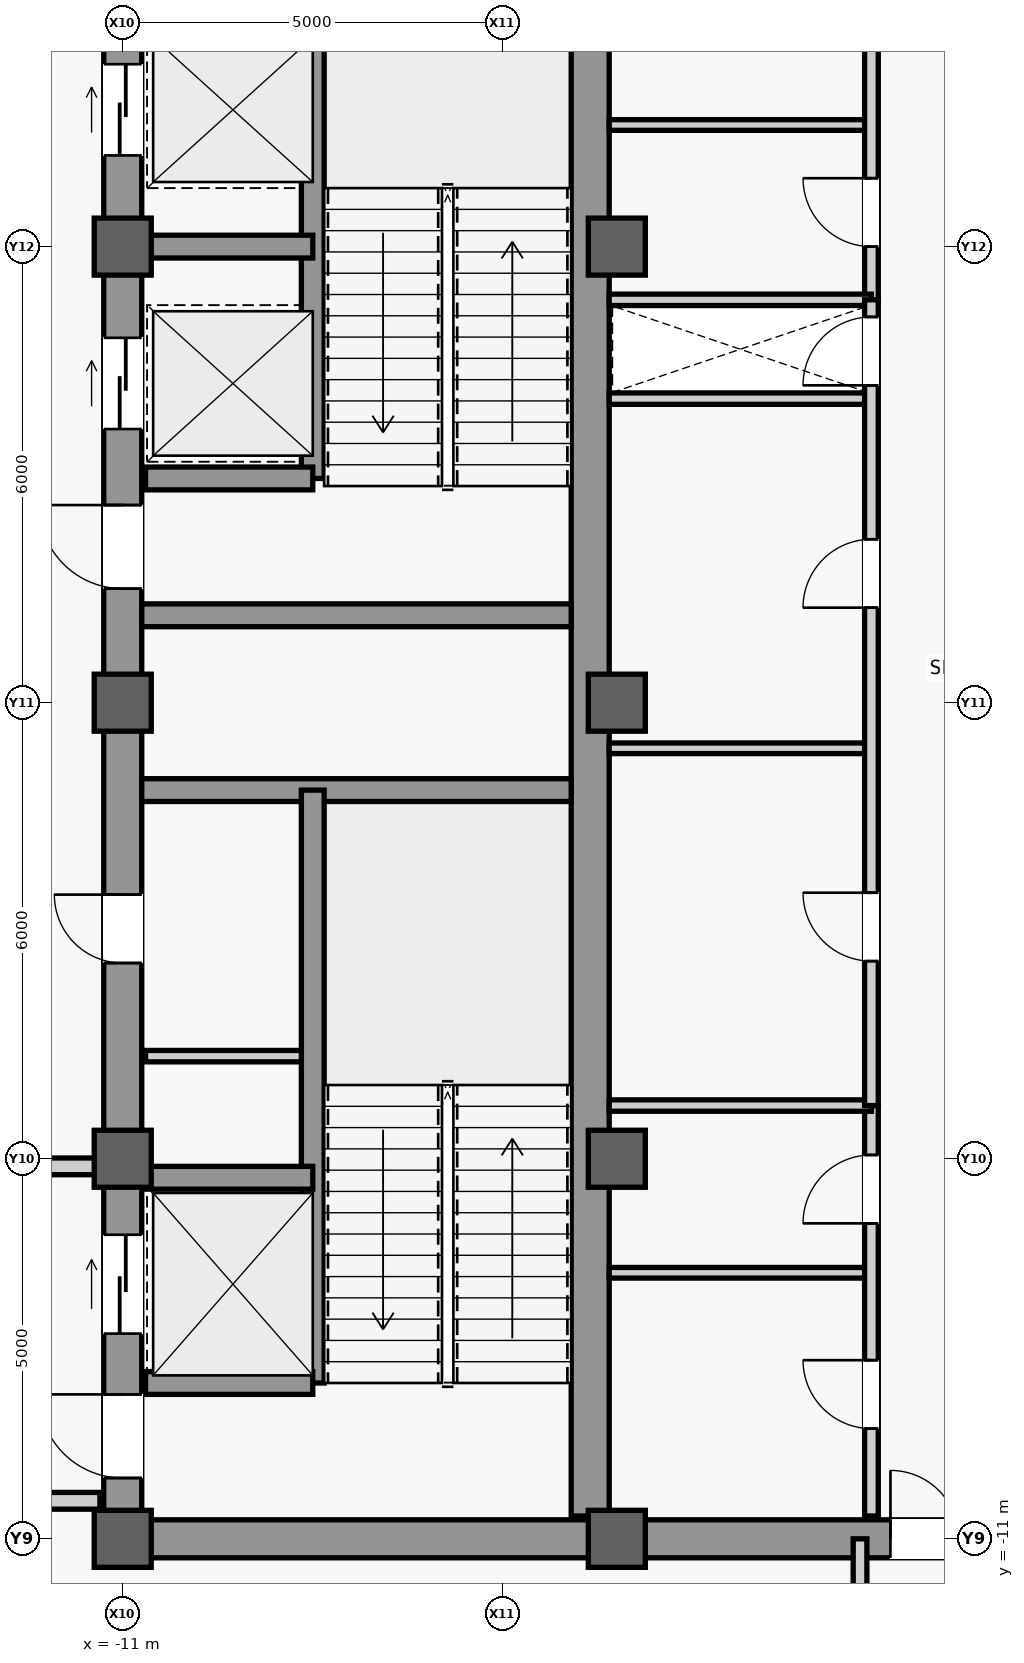
"""IFC4 building model, lengths in metres.
Left out: names, types, materials, properties, quantities, classifications, styles, units other than length and angle.
Written with IfcOpenShell. Run it as: python <this file> out.ifc"""

import sys

from ifc_helpers import new_model, si_unit, direction, frame, frame_2d, origin, origin_2d, place, context, subcontext, project, spatial, rectangle, extrude, source, transform, mapped, element, fill, save


model = new_model("IFC4")
c1 = context("Model", 3, precision=1e-05, world=origin(), true_north=direction((0.0, 1.0)))
c2 = subcontext(c1, "Body", "Model", "MODEL_VIEW")
j1 = project(units=[si_unit("LENGTHUNIT", "METRE"), si_unit("PLANEANGLEUNIT", "RADIAN")], contexts=[c1])
p1 = place(None, origin())
s1 = spatial("IfcSite", under=j1, at=p1, CompositionType="ELEMENT")
p2 = place(p1, origin())
s2 = spatial("IfcBuilding", under=s1, at=p2, CompositionType="ELEMENT")
p3 = place(p2, frame((0.0, 0.0, 370.3)))
s3 = spatial("IfcBuildingStorey", under=s2, at=p3, CompositionType="ELEMENT", Elevation=370.3)
m1 = source(origin(), c2, "Body", "SweptSolid", [
    extrude(rectangle(XDim=22.0, YDim=0.5, at=frame_2d((11.0, 0.0))), origin(), (0.0, 0.0, 1.0), 4.6),
])
p4 = place(p3, frame((-11.0, -11.0, 0.0), z_axis=(0.0, 0.0, 1.0), x_axis=(0.0, 1.0, 0.0)))
e1 = element("IfcWall", 1, at=p4, inside=s3, PredefinedType="SHEAR", context=c2, shape_type="MappedRepresentation", body=[
    mapped(m1, transform((0.0, 0.0, 0.0), scale=1.0)),
])
m2 = source(origin(), c2, "Body", "SweptSolid", [
    extrude(rectangle(XDim=1.1, YDim=2.2, at=frame_2d((0.55, 1.1))), frame((0.0, 0.26, 0.0), z_axis=(0.0, -1.0, 0.0), x_axis=(1.0, 0.0, 0.0)), (0.0, 0.0, 1.0), 0.52),
])
p5 = place(p4, frame((0.8, 0.0, 0.0)))
e2 = element("IfcOpeningElement", 2, at=p5, cuts=e1, PredefinedType="OPENING", context=c2, shape_type="MappedRepresentation", body=[
    mapped(m2, transform((0.0, 0.0, 0.0), scale=1.0)),
])
p6 = place(p4, frame((12.5, 0.0, 0.0)))
e3 = element("IfcOpeningElement", 3, at=p6, cuts=e1, PredefinedType="OPENING", context=c2, shape_type="MappedRepresentation", body=[
    mapped(m2, transform((0.0, 0.0, 0.0), scale=1.0)),
])
m3 = source(origin(), c2, "Body", "SweptSolid", [
    extrude(rectangle(XDim=0.9, YDim=2.15, at=frame_2d((0.45, 1.075))), frame((0.0, 0.26, 0.0), z_axis=(0.0, -1.0, 0.0), x_axis=(1.0, 0.0, 0.0)), (0.0, 0.0, 1.0), 0.52),
])
p7 = place(p4, frame((7.575, 0.0, 0.0)))
e4 = element("IfcOpeningElement", 4, at=p7, cuts=e1, PredefinedType="OPENING", context=c2, shape_type="MappedRepresentation", body=[
    mapped(m3, transform((0.0, 0.0, 0.0), scale=1.0)),
])
m4 = source(origin(), c2, "Body", "SweptSolid", [
    extrude(rectangle(XDim=1.2, YDim=2.3, at=frame_2d((0.6, 1.15))), frame((0.0, 0.26, 0.0), z_axis=(0.0, -1.0, 0.0), x_axis=(1.0, 0.0, 0.0)), (0.0, 0.0, 1.0), 0.52),
])
p8 = place(p4, frame((14.6, 0.0, 0.0)))
e5 = element("IfcOpeningElement", 5, at=p8, cuts=e1, PredefinedType="OPENING", context=c2, shape_type="MappedRepresentation", body=[
    mapped(m4, transform((0.0, 0.0, 0.0), scale=1.0)),
])
p9 = place(p4, frame((18.2, 0.0, 0.0)))
e6 = element("IfcOpeningElement", 6, at=p9, cuts=e1, PredefinedType="OPENING", context=c2, shape_type="MappedRepresentation", body=[
    mapped(m4, transform((0.0, 0.0, 0.0), scale=1.0)),
])
m5 = source(origin(), c2, "Body", "SweptSolid", [
    extrude(rectangle(XDim=1.3, YDim=2.3, at=frame_2d((0.65, 1.15))), frame((0.0, 0.26, 0.0), z_axis=(0.0, -1.0, 0.0), x_axis=(1.0, 0.0, 0.0)), (0.0, 0.0, 1.0), 0.52),
])
p10 = place(p4, frame((2.7, 0.0, 0.0)))
e7 = element("IfcOpeningElement", 7, at=p10, cuts=e1, PredefinedType="OPENING", context=c2, shape_type="MappedRepresentation", body=[
    mapped(m5, transform((0.0, 0.0, 0.0), scale=1.0)),
])
m6 = source(origin(), c2, "Body", "SweptSolid", [
    extrude(rectangle(XDim=21.4, YDim=0.5, at=frame_2d((10.7, 0.0))), origin(), (0.0, 0.0, 1.0), 4.6),
])
p11 = place(p3, frame((-4.85, -10.7, 0.0), z_axis=(0.0, 0.0, 1.0), x_axis=(0.0, 1.0, 0.0)))
e8 = element("IfcWall", 8, at=p11, inside=s3, PredefinedType="SHEAR", context=c2, shape_type="MappedRepresentation", body=[
    mapped(m6, transform((0.0, 0.0, 0.0), scale=1.0)),
])
m7 = source(origin(), c2, "Body", "SweptSolid", [
    extrude(rectangle(XDim=5.9, YDim=0.5, at=frame_2d((2.95, 0.0))), origin(), (0.0, 0.0, 1.0), 4.6),
])
p12 = place(p3, frame((-10.75, -11.0, 0.0), z_axis=(0.0, 0.0, 1.0), x_axis=(1.0, 0.0, 0.0)))
e9 = element("IfcWall", 9, at=p12, inside=s3, PredefinedType="SHEAR", context=c2, shape_type="MappedRepresentation", body=[
    mapped(m7, transform((0.0, 0.0, 0.0), scale=1.0)),
])
m8 = source(origin(), c2, "Body", "SweptSolid", [
    extrude(rectangle(XDim=5.65, YDim=0.3, at=frame_2d((2.825, 0.0))), origin(), (0.0, 0.0, 1.0), 4.6),
])
for number, where, z_axis, x_axis in (
    (10, (-10.75, -1.15, 0.0), (0.0, 0.0, 1.0), (1.0, 0.0, 0.0)),
    (11, (-10.75, 1.15, 0.0), (0.0, 0.0, 1.0), (1.0, 0.0, 0.0)),
):
    element("IfcWall", number, at=place(p3, frame(where, z_axis=z_axis, x_axis=x_axis)), inside=s3, PredefinedType="SHEAR", context=c2, shape_type="MappedRepresentation", body=[
        mapped(m8, transform((0.0, 0.0, 0.0), scale=1.0)),
    ])
m9 = source(origin(), c2, "Body", "SweptSolid", [
    extrude(rectangle(XDim=9.2, YDim=0.5, at=frame_2d((4.6, 0.0))), origin(), (0.0, 0.0, 1.0), 4.6),
])
p13 = place(p3, frame((-4.6, -11.0, 0.0), z_axis=(0.0, 0.0, 1.0), x_axis=(1.0, 0.0, 0.0)))
e12 = element("IfcWall", 12, at=p13, inside=s3, PredefinedType="SHEAR", context=c2, shape_type="MappedRepresentation", body=[
    mapped(m9, transform((0.0, 0.0, 0.0), scale=1.0)),
])
m10 = source(origin(), c2, "Body", "SweptSolid", [
    extrude(rectangle(XDim=1.8, YDim=2.25, at=frame_2d((0.9, 1.125))), frame((0.0, 0.26, 0.0), z_axis=(0.0, -1.0, 0.0), x_axis=(1.0, 0.0, 0.0)), (0.0, 0.0, 1.0), 0.52),
])
p14 = place(p13, frame((3.7, 0.0, 0.0)))
e13 = element("IfcOpeningElement", 13, at=p14, cuts=e12, PredefinedType="OPENING", context=c2, shape_type="MappedRepresentation", body=[
    mapped(m10, transform((0.0, 0.0, 0.0), scale=1.0)),
])
m11 = source(origin(), c2, "Body", "SweptSolid", [
    extrude(rectangle(XDim=0.75, YDim=0.75, at=origin_2d()), origin(), (0.0, 0.0, 1.0), 5.2),
])
for number, where, z_axis, x_axis in (
    (14, (-11.0, -11.0, 0.0), (0.0, 0.0, 1.0), (1.0, 0.0, 0.0)),
    (15, (-11.0, -6.0, 0.0), (0.0, 0.0, 1.0), (1.0, 0.0, 0.0)),
    (16, (-11.0, 0.0, 0.0), (0.0, 0.0, 1.0), (1.0, 0.0, 0.0)),
    (17, (-11.0, 6.0, 0.0), (0.0, 0.0, 1.0), (1.0, 0.0, 0.0)),
    (18, (-4.5, -11.0, 0.0), (0.0, 0.0, 1.0), (1.0, 0.0, 0.0)),
    (19, (-4.5, -6.0, 0.0), (0.0, 0.0, 1.0), (1.0, 0.0, 0.0)),
    (20, (-4.5, 0.0, 0.0), (0.0, 0.0, 1.0), (1.0, 0.0, 0.0)),
    (21, (-4.5, 6.0, 0.0), (0.0, 0.0, 1.0), (1.0, 0.0, 0.0)),
):
    element("IfcColumn", number, at=place(p3, frame(where, z_axis=z_axis, x_axis=x_axis)), inside=s3, PredefinedType="COLUMN", context=c2, shape_type="MappedRepresentation", body=[
        mapped(m11, transform((0.0, 0.0, 0.0), scale=1.0)),
    ])
m12 = source(origin(), c2, "Body", "SweptSolid", [
    extrude(rectangle(XDim=7.8, YDim=0.3, at=frame_2d((3.9, 0.0))), origin(), (0.0, 0.0, 1.0), 4.6),
])
p15 = place(p3, frame((-8.5, -8.95, 0.0), z_axis=(0.0, 0.0, 1.0), x_axis=(0.0, 1.0, 0.0)))
e22 = element("IfcWall", 22, at=p15, inside=s3, PredefinedType="SHEAR", context=c2, shape_type="MappedRepresentation", body=[
    mapped(m12, transform((0.0, 0.0, 0.0), scale=1.0)),
])
m13 = source(origin(), c2, "Body", "SweptSolid", [
    extrude(rectangle(XDim=2.2, YDim=0.3, at=frame_2d((1.1, 0.0))), origin(), (0.0, 0.0, 1.0), 4.6),
])
for number, where, z_axis, x_axis in (
    (23, (-10.7, -8.95, 0.0), (0.0, 0.0, 1.0), (1.0, 0.0, 0.0)),
    (24, (-10.7, -6.25, 0.0), (0.0, 0.0, 1.0), (1.0, 0.0, 0.0)),
):
    element("IfcWall", number, at=place(p3, frame(where, z_axis=z_axis, x_axis=x_axis)), inside=s3, PredefinedType="SHEAR", context=c2, shape_type="MappedRepresentation", body=[
        mapped(m13, transform((0.0, 0.0, 0.0), scale=1.0)),
    ])
m14 = source(origin(), c2, "Body", "SweptSolid", [
    extrude(rectangle(XDim=7.75, YDim=0.3, at=frame_2d((3.875, 0.0))), origin(), (0.0, 0.0, 1.0), 4.6),
])
p16 = place(p3, frame((-8.5, 2.95, 0.0), z_axis=(0.0, 0.0, 1.0), x_axis=(0.0, 1.0, 0.0)))
e25 = element("IfcWall", 25, at=p16, inside=s3, PredefinedType="SHEAR", context=c2, shape_type="MappedRepresentation", body=[
    mapped(m14, transform((0.0, 0.0, 0.0), scale=1.0)),
])
for number, where, z_axis, x_axis in (
    (26, (-10.7, 2.95, 0.0), (0.0, 0.0, 1.0), (1.0, 0.0, 0.0)),
    (27, (-10.7, 6.0, 0.0), (0.0, 0.0, 1.0), (1.0, 0.0, 0.0)),
):
    element("IfcWall", number, at=place(p3, frame(where, z_axis=z_axis, x_axis=x_axis)), inside=s3, PredefinedType="SHEAR", context=c2, shape_type="MappedRepresentation", body=[
        mapped(m13, transform((0.0, 0.0, 0.0), scale=1.0)),
    ])
m15 = source(origin(), c2, "Body", "SweptSolid", [
    extrude(rectangle(XDim=2.05, YDim=0.15, at=frame_2d((1.025, 0.0))), origin(), (0.0, 0.0, 1.0), 4.6),
])
p17 = place(p3, frame((-10.7, -4.65, 0.0), z_axis=(0.0, 0.0, 1.0), x_axis=(1.0, 0.0, 0.0)))
e28 = element("IfcWall", 28, at=p17, inside=s3, PredefinedType="PARTITIONING", context=c2, shape_type="MappedRepresentation", body=[
    mapped(m15, transform((0.0, 0.0, 0.0), scale=1.0)),
])
m16 = source(origin(), c2, "Body", "SweptSolid", [
    extrude(rectangle(XDim=4.05, YDim=0.22, at=frame_2d((2.025, 0.0))), origin(), (0.0, 0.0, 1.0), 4.6),
])
p18 = place(p3, frame((-15.35, -10.5, 0.0), z_axis=(0.0, 0.0, 1.0), x_axis=(1.0, 0.0, 0.0)))
e29 = element("IfcWall", 29, at=p18, inside=s3, PredefinedType="PARTITIONING", context=c2, shape_type="MappedRepresentation", body=[
    mapped(m16, transform((0.0, 0.0, 0.0), scale=1.0)),
])
m17 = source(origin(), c2, "Body", "SweptSolid", [
    extrude(rectangle(XDim=4.05, YDim=0.22, at=frame_2d((2.025, 0.0))), origin(), (0.0, 0.0, 1.0), 2.8),
])
p19 = place(p3, frame((-15.35, -6.1, 0.0), z_axis=(0.0, 0.0, 1.0), x_axis=(1.0, 0.0, 0.0)))
e30 = element("IfcWall", 30, at=p19, inside=s3, PredefinedType="PARTITIONING", context=c2, shape_type="MappedRepresentation", body=[
    mapped(m17, transform((0.0, 0.0, 0.0), scale=1.0)),
])
m18 = source(origin(), c2, "Body", "SweptSolid", [
    extrude(rectangle(XDim=3.45, YDim=0.15, at=frame_2d((1.725, 0.0))), origin(), (0.0, 0.0, 1.0), 4.6),
])
p20 = place(p3, frame((-4.6, 4.0, 0.0), z_axis=(0.0, 0.0, 1.0), x_axis=(1.0, 0.0, 0.0)))
e31 = element("IfcWall", 31, at=p20, inside=s3, PredefinedType="PARTITIONING", context=c2, shape_type="MappedRepresentation", body=[
    mapped(m18, transform((0.0, 0.0, 0.0), scale=1.0)),
])
m19 = source(origin(), c2, "Body", "SweptSolid", [
    extrude(rectangle(XDim=3.45, YDim=0.14, at=frame_2d((1.725, 0.0))), origin(), (0.0, 0.0, 1.0), 4.6),
])
p21 = place(p3, frame((-4.6, -7.5, 0.0), z_axis=(0.0, 0.0, 1.0), x_axis=(1.0, 0.0, 0.0)))
e32 = element("IfcWall", 32, at=p21, inside=s3, PredefinedType="PARTITIONING", context=c2, shape_type="MappedRepresentation", body=[
    mapped(m19, transform((0.0, 0.0, 0.0), scale=1.0)),
])
m20 = source(origin(), c2, "Body", "SweptSolid", [
    extrude(rectangle(XDim=5.4, YDim=0.18, at=frame_2d((2.7, 0.0))), origin(), (0.0, 0.0, 1.0), 4.6),
])
p22 = place(p3, frame((-1.15, -10.7, 0.0), z_axis=(0.0, 0.0, 1.0), x_axis=(0.0, 1.0, 0.0)))
e33 = element("IfcWall", 33, at=p22, inside=s3, PredefinedType="PARTITIONING", context=c2, shape_type="MappedRepresentation", body=[
    mapped(m20, transform((0.0, 0.0, 0.0), scale=1.0)),
])
m21 = source(origin(), c2, "Body", "SweptSolid", [
    extrude(rectangle(XDim=0.9, YDim=2.15, at=frame_2d((0.45, 1.075))), frame((0.0, 0.1, 0.0), z_axis=(0.0, -1.0, 0.0), x_axis=(1.0, 0.0, 0.0)), (0.0, 0.0, 1.0), 0.2),
])
p23 = place(p22, frame((1.15, 0.0, 0.0)))
e34 = element("IfcOpeningElement", 34, at=p23, cuts=e33, PredefinedType="OPENING", context=c2, shape_type="MappedRepresentation", body=[
    mapped(m21, transform((0.0, 0.0, 0.0), scale=1.0)),
])
p24 = place(p22, frame((3.85, 0.0, 0.0)))
e35 = element("IfcOpeningElement", 35, at=p24, cuts=e33, PredefinedType="OPENING", context=c2, shape_type="MappedRepresentation", body=[
    mapped(m21, transform((0.0, 0.0, 0.0), scale=1.0)),
])
p25 = place(p3, frame((-4.6, -5.3, 0.0), z_axis=(0.0, 0.0, 1.0), x_axis=(1.0, 0.0, 0.0)))
e36 = element("IfcWall", 36, at=p25, inside=s3, PredefinedType="PARTITIONING", context=c2, shape_type="MappedRepresentation", body=[
    mapped(m18, transform((0.0, 0.0, 0.0), scale=1.0)),
])
p26 = place(p3, frame((-4.6, 7.6, 0.0), z_axis=(0.0, 0.0, 1.0), x_axis=(1.0, 0.0, 0.0)))
e37 = element("IfcWall", 37, at=p26, inside=s3, PredefinedType="PARTITIONING", context=c2, shape_type="MappedRepresentation", body=[
    mapped(m19, transform((0.0, 0.0, 0.0), scale=1.0)),
])
p27 = place(p3, frame((-1.15, 5.3, 0.0), z_axis=(0.0, 0.0, 1.0), x_axis=(0.0, 1.0, 0.0)))
e38 = element("IfcWall", 38, at=p27, inside=s3, PredefinedType="PARTITIONING", context=c2, shape_type="MappedRepresentation", body=[
    mapped(m20, transform((0.0, 0.0, 0.0), scale=1.0)),
])
p28 = place(p27, frame((0.7, 0.0, 0.0)))
e39 = element("IfcOpeningElement", 39, at=p28, cuts=e38, PredefinedType="OPENING", context=c2, shape_type="MappedRepresentation", body=[
    mapped(m21, transform((0.0, 0.0, 0.0), scale=1.0)),
])
p29 = place(p27, frame((3.4, 0.0, 0.0)))
e40 = element("IfcOpeningElement", 40, at=p29, cuts=e38, PredefinedType="OPENING", context=c2, shape_type="MappedRepresentation", body=[
    mapped(m21, transform((0.0, 0.0, 0.0), scale=1.0)),
])
p30 = place(p3, frame((-4.6, 5.3, 0.0), z_axis=(0.0, 0.0, 1.0), x_axis=(1.0, 0.0, 0.0)))
e41 = element("IfcWall", 41, at=p30, inside=s3, PredefinedType="PARTITIONING", context=c2, shape_type="MappedRepresentation", body=[
    mapped(m18, transform((0.0, 0.0, 0.0), scale=1.0)),
])
p31 = place(p3, frame((-4.6, -0.6, 0.0), z_axis=(0.0, 0.0, 1.0), x_axis=(1.0, 0.0, 0.0)))
e42 = element("IfcWall", 42, at=p31, inside=s3, PredefinedType="PARTITIONING", context=c2, shape_type="MappedRepresentation", body=[
    mapped(m19, transform((0.0, 0.0, 0.0), scale=1.0)),
])
m22 = source(origin(), c2, "Body", "SweptSolid", [
    extrude(rectangle(XDim=10.6, YDim=0.18, at=frame_2d((5.3, 0.0))), origin(), (0.0, 0.0, 1.0), 4.6),
])
p32 = place(p3, frame((-1.15, -5.3, 0.0), z_axis=(0.0, 0.0, 1.0), x_axis=(0.0, 1.0, 0.0)))
e43 = element("IfcWall", 43, at=p32, inside=s3, PredefinedType="PARTITIONING", context=c2, shape_type="MappedRepresentation", body=[
    mapped(m22, transform((0.0, 0.0, 0.0), scale=1.0)),
])
p33 = place(p32, frame((1.9, 0.0, 0.0)))
e44 = element("IfcOpeningElement", 44, at=p33, cuts=e43, PredefinedType="OPENING", context=c2, shape_type="MappedRepresentation", body=[
    mapped(m21, transform((0.0, 0.0, 0.0), scale=1.0)),
])
p34 = place(p32, frame((6.55, 0.0, 0.0)))
e45 = element("IfcOpeningElement", 45, at=p34, cuts=e43, PredefinedType="OPENING", context=c2, shape_type="MappedRepresentation", body=[
    mapped(m21, transform((0.0, 0.0, 0.0), scale=1.0)),
])
p35 = place(p32, frame((9.475, 0.0, 0.0)))
e46 = element("IfcOpeningElement", 46, at=p35, cuts=e43, PredefinedType="OPENING", context=c2, shape_type="MappedRepresentation", body=[
    mapped(m21, transform((0.0, 0.0, 0.0), scale=1.0)),
])
m23 = source(origin(), c2, "Body", "SweptSolid", [
    extrude(rectangle(XDim=6.0, YDim=0.18, at=frame_2d((3.0, 0.0))), origin(), (0.0, 0.0, 1.0), 4.6),
])
p36 = place(p3, frame((-1.3, -17.0, 0.0), z_axis=(0.0, 0.0, 1.0), x_axis=(0.0, 1.0, 0.0)))
e47 = element("IfcWall", 47, at=p36, inside=s3, PredefinedType="PARTITIONING", context=c2, shape_type="MappedRepresentation", body=[
    mapped(m23, transform((0.0, 0.0, 0.0), scale=1.0)),
])
m24 = source(origin(), c2, "Body", "SweptSolid", [
    extrude(rectangle(XDim=1.1, YDim=2.2, at=frame_2d((0.55, 1.1))), frame((0.0, 0.025, 0.0), z_axis=(0.0, -1.0, 0.0), x_axis=(1.0, 0.0, 0.0)), (0.0, 0.0, 1.0), 0.05),
])
p37 = place(p5, origin())
e48 = element("IfcDoor", 48, at=p37, inside=s3, OperationType="SINGLE_SWING_RIGHT", PredefinedType="DOOR", context=c2, shape_type="MappedRepresentation", body=[
    mapped(m24, transform((0.0, 0.0, 0.0), scale=1.0)),
])
fill(e2, e48)
p38 = place(p6, origin())
e49 = element("IfcDoor", 49, at=p38, inside=s3, OperationType="SINGLE_SWING_RIGHT", PredefinedType="DOOR", context=c2, shape_type="MappedRepresentation", body=[
    mapped(m24, transform((0.0, 0.0, 0.0), scale=1.0)),
])
fill(e3, e49)
m25 = source(origin(), c2, "Body", "SweptSolid", [
    extrude(rectangle(XDim=0.9, YDim=2.15, at=frame_2d((0.45, 1.075))), frame((0.0, 0.025, 0.0), z_axis=(0.0, -1.0, 0.0), x_axis=(1.0, 0.0, 0.0)), (0.0, 0.0, 1.0), 0.05),
])
p39 = place(p7, origin())
e50 = element("IfcDoor", 50, at=p39, inside=s3, OperationType="SINGLE_SWING_RIGHT", PredefinedType="DOOR", context=c2, shape_type="MappedRepresentation", body=[
    mapped(m25, transform((0.0, 0.0, 0.0), scale=1.0)),
])
fill(e4, e50)
p40 = place(p23, origin())
e51 = element("IfcDoor", 51, at=p40, inside=s3, OperationType="SINGLE_SWING_RIGHT", PredefinedType="DOOR", context=c2, shape_type="MappedRepresentation", body=[
    mapped(m25, transform((0.0, 0.0, 0.0), scale=1.0)),
])
fill(e34, e51)
p41 = place(p24, origin())
e52 = element("IfcDoor", 52, at=p41, inside=s3, OperationType="SINGLE_SWING_LEFT", PredefinedType="DOOR", context=c2, shape_type="MappedRepresentation", body=[
    mapped(m25, transform((0.0, 0.0, 0.0), scale=1.0)),
])
fill(e35, e52)
m26 = source(origin(), c2, "Body", "SweptSolid", [
    extrude(rectangle(XDim=1.8, YDim=2.25, at=frame_2d((0.9, 1.125))), frame((0.0, 0.025, 0.0), z_axis=(0.0, -1.0, 0.0), x_axis=(1.0, 0.0, 0.0)), (0.0, 0.0, 1.0), 0.05),
])
p42 = place(p14, origin())
e53 = element("IfcDoor", 53, at=p42, inside=s3, OperationType="SINGLE_SWING_LEFT", PredefinedType="DOOR", context=c2, shape_type="MappedRepresentation", body=[
    mapped(m26, transform((0.0, 0.0, 0.0), scale=1.0)),
])
fill(e13, e53)
p43 = place(p28, origin())
e54 = element("IfcDoor", 54, at=p43, inside=s3, OperationType="SINGLE_SWING_RIGHT", PredefinedType="DOOR", context=c2, shape_type="MappedRepresentation", body=[
    mapped(m25, transform((0.0, 0.0, 0.0), scale=1.0)),
])
fill(e39, e54)
p44 = place(p33, origin())
e55 = element("IfcDoor", 55, at=p44, inside=s3, OperationType="SINGLE_SWING_RIGHT", PredefinedType="DOOR", context=c2, shape_type="MappedRepresentation", body=[
    mapped(m25, transform((0.0, 0.0, 0.0), scale=1.0)),
])
fill(e44, e55)
p45 = place(p34, origin())
e56 = element("IfcDoor", 56, at=p45, inside=s3, OperationType="SINGLE_SWING_LEFT", PredefinedType="DOOR", context=c2, shape_type="MappedRepresentation", body=[
    mapped(m25, transform((0.0, 0.0, 0.0), scale=1.0)),
])
fill(e45, e56)
p46 = place(p35, origin())
e57 = element("IfcDoor", 57, at=p46, inside=s3, OperationType="SINGLE_SWING_LEFT", PredefinedType="DOOR", context=c2, shape_type="MappedRepresentation", body=[
    mapped(m25, transform((0.0, 0.0, 0.0), scale=1.0)),
])
fill(e46, e57)
m27 = source(origin(), c2, "Body", "SweptSolid", [
    extrude(rectangle(XDim=1.2, YDim=2.3, at=frame_2d((0.6, 1.15))), frame((0.0, 0.025, 0.0), z_axis=(0.0, -1.0, 0.0), x_axis=(1.0, 0.0, 0.0)), (0.0, 0.0, 1.0), 0.05),
])
p47 = place(p8, origin())
e58 = element("IfcDoor", 58, at=p47, inside=s3, OperationType="SLIDING_TO_LEFT", PredefinedType="DOOR", context=c2, shape_type="MappedRepresentation", body=[
    mapped(m27, transform((0.0, 0.0, 0.0), scale=1.0)),
])
fill(e5, e58)
p48 = place(p9, origin())
e59 = element("IfcDoor", 59, at=p48, inside=s3, OperationType="SLIDING_TO_LEFT", PredefinedType="DOOR", context=c2, shape_type="MappedRepresentation", body=[
    mapped(m27, transform((0.0, 0.0, 0.0), scale=1.0)),
])
fill(e6, e59)
m28 = source(origin(), c2, "Body", "SweptSolid", [
    extrude(rectangle(XDim=1.3, YDim=2.3, at=frame_2d((0.65, 1.15))), frame((0.0, 0.025, 0.0), z_axis=(0.0, -1.0, 0.0), x_axis=(1.0, 0.0, 0.0)), (0.0, 0.0, 1.0), 0.05),
])
p49 = place(p10, origin())
e60 = element("IfcDoor", 60, at=p49, inside=s3, OperationType="SLIDING_TO_LEFT", PredefinedType="DOOR", context=c2, shape_type="MappedRepresentation", body=[
    mapped(m28, transform((0.0, 0.0, 0.0), scale=1.0)),
])
fill(e7, e60)
save(model, sys.argv[1])
